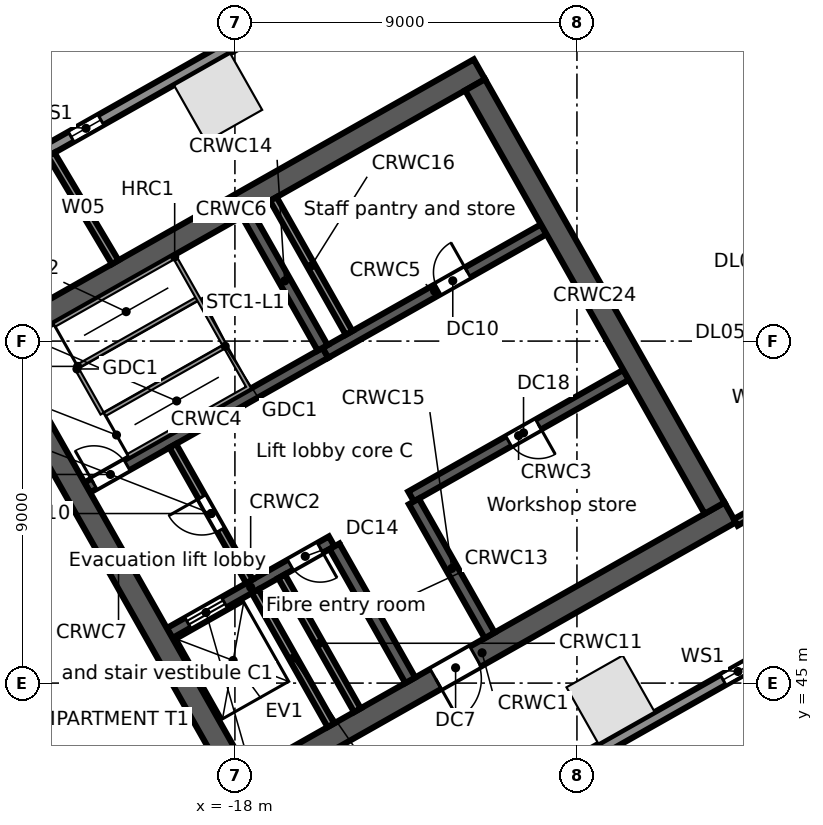
"""IFC4 building model, lengths in metres.
Left out: names, types, materials, properties, quantities, classifications, styles, units other than length and angle.
Written with IfcOpenShell. Run it as: python <this file> out.ifc"""

import sys

from ifc_helpers import new_model, si_unit, direction, frame, frame_2d, origin, origin_2d, place, context, subcontext, project, spatial, rectangle, extrude, element, fill, save


model = new_model("IFC4")
c1 = context("Model", 3, precision=1e-05, world=origin(), true_north=direction((0.0, 1.0)))
c2 = subcontext(c1, "Body", "Model", "MODEL_VIEW")
j1 = project(units=[si_unit("LENGTHUNIT", "METRE"), si_unit("PLANEANGLEUNIT", "RADIAN")], contexts=[c1])
p1 = place(None, origin())
s1 = spatial("IfcSite", under=j1, at=p1, CompositionType="ELEMENT")
p2 = place(p1, origin())
s2 = spatial("IfcBuilding", under=s1, at=p2, CompositionType="ELEMENT")
p3 = place(p2, frame((0.0, 0.0, 36.5)))
s3 = spatial("IfcBuildingStorey", under=s2, at=p3, CompositionType="ELEMENT", Elevation=36.5)
for number, where, z_axis, x_axis in (
    (1, (-18.441, 60.406, 0.0), (0.0, 0.0, 1.0), (-0.87, -0.492, 0.0)),
    (2, (-8.117, 44.568, 0.0), (0.0, 0.0, 1.0), (0.87, 0.492, 0.0)),
):
    element("IfcColumn", number, at=place(p3, frame(where, z_axis=z_axis, x_axis=x_axis)), inside=s3, PredefinedType="COLUMN", context=c2, shape_type="SweptSolid", body=[
        extrude(rectangle(XDim=1.7, YDim=1.7, at=origin_2d()), origin(), (0.0, 0.0, 1.0), 5.0),
    ])
p4 = place(p3, frame((-58.745, 38.764, 0.0), z_axis=(0.0, 0.0, 1.0), x_axis=(0.870355811726, 0.492423355453, 0.0)))
e3 = element("IfcWall", 3, at=p4, inside=s3, PredefinedType="STANDARD", context=c2, shape_type="SweptSolid", body=[
    extrude(rectangle(XDim=64.025, YDim=0.3, at=frame_2d((32.013, 0.0))), origin(), (0.0, 0.0, 1.0), 4.68),
])
p5 = place(p4, frame((60.122, 0.0, 0.6)))
e4 = element("IfcOpeningElement", 4, at=p5, cuts=e3, PredefinedType="OPENING", context=c2, shape_type="SweptSolid", body=[
    extrude(rectangle(XDim=0.9, YDim=3.2, at=frame_2d((0.45, 1.6))), frame((0.0, 0.16, 0.0), z_axis=(0.0, -1.0, 0.0), x_axis=(1.0, 0.0, 0.0)), (0.0, 0.0, 1.0), 0.32),
])
p6 = place(p4, frame((50.992, 0.0, 0.6)))
e5 = element("IfcOpeningElement", 5, at=p6, cuts=e3, PredefinedType="OPENING", context=c2, shape_type="SweptSolid", body=[
    extrude(rectangle(XDim=0.9, YDim=3.2, at=frame_2d((0.45, 1.6))), frame((0.0, 0.16, 0.0), z_axis=(0.0, -1.0, 0.0), x_axis=(1.0, 0.0, 0.0)), (0.0, 0.0, 1.0), 0.32),
])
p7 = place(p4, frame((41.862, 0.0, 0.6)))
e6 = element("IfcOpeningElement", 6, at=p7, cuts=e3, PredefinedType="OPENING", context=c2, shape_type="SweptSolid", body=[
    extrude(rectangle(XDim=0.9, YDim=3.2, at=frame_2d((0.45, 1.6))), frame((0.0, 0.16, 0.0), z_axis=(0.0, -1.0, 0.0), x_axis=(1.0, 0.0, 0.0)), (0.0, 0.0, 1.0), 0.32),
])
p8 = place(p4, frame((32.732, 0.0, 0.6)))
e7 = element("IfcOpeningElement", 7, at=p8, cuts=e3, PredefinedType="OPENING", context=c2, shape_type="SweptSolid", body=[
    extrude(rectangle(XDim=0.9, YDim=3.2, at=frame_2d((0.45, 1.6))), frame((0.0, 0.16, 0.0), z_axis=(0.0, -1.0, 0.0), x_axis=(1.0, 0.0, 0.0)), (0.0, 0.0, 1.0), 0.32),
])
p9 = place(p4, frame((23.602, 0.0, 0.6)))
e8 = element("IfcOpeningElement", 8, at=p9, cuts=e3, PredefinedType="OPENING", context=c2, shape_type="SweptSolid", body=[
    extrude(rectangle(XDim=0.9, YDim=3.2, at=frame_2d((0.45, 1.6))), frame((0.0, 0.16, 0.0), z_axis=(0.0, -1.0, 0.0), x_axis=(1.0, 0.0, 0.0)), (0.0, 0.0, 1.0), 0.32),
])
p10 = place(p4, frame((14.472, 0.0, 0.6)))
e9 = element("IfcOpeningElement", 9, at=p10, cuts=e3, PredefinedType="OPENING", context=c2, shape_type="SweptSolid", body=[
    extrude(rectangle(XDim=0.9, YDim=3.2, at=frame_2d((0.45, 1.6))), frame((0.0, 0.16, 0.0), z_axis=(0.0, -1.0, 0.0), x_axis=(1.0, 0.0, 0.0)), (0.0, 0.0, 1.0), 0.32),
])
p11 = place(p4, frame((5.342, 0.0, 0.6)))
e10 = element("IfcOpeningElement", 10, at=p11, cuts=e3, PredefinedType="OPENING", context=c2, shape_type="SweptSolid", body=[
    extrude(rectangle(XDim=0.9, YDim=3.2, at=frame_2d((0.45, 1.6))), frame((0.0, 0.16, 0.0), z_axis=(0.0, -1.0, 0.0), x_axis=(1.0, 0.0, 0.0)), (0.0, 0.0, 1.0), 0.32),
])
p12 = place(p3, frame((-0.055, 47.969, 0.0), z_axis=(0.0, 0.0, 1.0), x_axis=(-0.870355730478, -0.492423499058, 0.0)))
e11 = element("IfcWall", 11, at=p12, inside=s3, PredefinedType="STANDARD", context=c2, shape_type="SweptSolid", body=[
    extrude(rectangle(XDim=43.75, YDim=0.3, at=frame_2d((21.875, 0.0))), origin(), (0.0, 0.0, 1.0), 4.68),
])
p13 = place(p12, frame((39.977, 0.0, 0.6)))
e12 = element("IfcOpeningElement", 12, at=p13, cuts=e11, PredefinedType="OPENING", context=c2, shape_type="SweptSolid", body=[
    extrude(rectangle(XDim=0.9, YDim=3.2, at=frame_2d((0.45, 1.6))), frame((0.0, 0.16, 0.0), z_axis=(0.0, -1.0, 0.0), x_axis=(1.0, 0.0, 0.0)), (0.0, 0.0, 1.0), 0.32),
])
p14 = place(p12, frame((31.222, 0.0, 0.6)))
e13 = element("IfcOpeningElement", 13, at=p14, cuts=e11, PredefinedType="OPENING", context=c2, shape_type="SweptSolid", body=[
    extrude(rectangle(XDim=0.9, YDim=3.2, at=frame_2d((0.45, 1.6))), frame((0.0, 0.16, 0.0), z_axis=(0.0, -1.0, 0.0), x_axis=(1.0, 0.0, 0.0)), (0.0, 0.0, 1.0), 0.32),
])
p15 = place(p12, frame((22.468, 0.0, 0.6)))
e14 = element("IfcOpeningElement", 14, at=p15, cuts=e11, PredefinedType="OPENING", context=c2, shape_type="SweptSolid", body=[
    extrude(rectangle(XDim=0.9, YDim=3.2, at=frame_2d((0.45, 1.6))), frame((0.0, 0.16, 0.0), z_axis=(0.0, -1.0, 0.0), x_axis=(1.0, 0.0, 0.0)), (0.0, 0.0, 1.0), 0.32),
])
p16 = place(p12, frame((13.713, 0.0, 0.6)))
e15 = element("IfcOpeningElement", 15, at=p16, cuts=e11, PredefinedType="OPENING", context=c2, shape_type="SweptSolid", body=[
    extrude(rectangle(XDim=0.9, YDim=3.2, at=frame_2d((0.45, 1.6))), frame((0.0, 0.16, 0.0), z_axis=(0.0, -1.0, 0.0), x_axis=(1.0, 0.0, 0.0)), (0.0, 0.0, 1.0), 0.32),
])
p17 = place(p12, frame((4.959, 0.0, 0.6)))
e16 = element("IfcOpeningElement", 16, at=p17, cuts=e11, PredefinedType="OPENING", context=c2, shape_type="SweptSolid", body=[
    extrude(rectangle(XDim=0.9, YDim=3.2, at=frame_2d((0.45, 1.6))), frame((0.0, 0.16, 0.0), z_axis=(0.0, -1.0, 0.0), x_axis=(1.0, 0.0, 0.0)), (0.0, 0.0, 1.0), 0.32),
])
p18 = place(p3, frame((-18.024, 42.104, 0.0), z_axis=(0.0, 0.0, 1.0), x_axis=(0.870360574057, 0.492414937962, 0.0)))
e17 = element("IfcWall", 17, at=p18, inside=s3, PredefinedType="SOLIDWALL", context=c2, shape_type="SweptSolid", body=[
    extrude(rectangle(XDim=15.0, YDim=0.6, at=frame_2d((7.5, 0.0))), origin(), (0.0, 0.0, 1.0), 4.68),
])
p19 = place(p18, frame((6.1, 0.0, 0.0)))
e18 = element("IfcOpeningElement", 18, at=p19, cuts=e17, PredefinedType="OPENING", context=c2, shape_type="SweptSolid", body=[
    extrude(rectangle(XDim=1.2, YDim=2.1, at=frame_2d((0.6, 1.05))), frame((0.0, 0.31, 0.0), z_axis=(0.0, -1.0, 0.0), x_axis=(1.0, 0.0, 0.0)), (0.0, 0.0, 1.0), 0.62),
])
p20 = place(p3, frame((-19.718, 46.316, 0.0), z_axis=(0.0, 0.0, 1.0), x_axis=(0.870353963862, 0.492426621528, 0.0)))
e19 = element("IfcWall", 19, at=p20, inside=s3, PredefinedType="SOLIDWALL", context=c2, shape_type="SweptSolid", body=[
    extrude(rectangle(XDim=4.9, YDim=0.3, at=frame_2d((2.45, 0.0))), origin(), (0.0, 0.0, 1.0), 4.68),
])
p21 = place(p20, frame((0.55, 0.0, 0.0)))
e20 = element("IfcOpeningElement", 20, at=p21, cuts=e19, PredefinedType="OPENING", context=c2, shape_type="SweptSolid", body=[
    extrude(rectangle(XDim=1.1, YDim=2.1, at=frame_2d((0.55, 1.05))), frame((0.0, 0.16, 0.0), z_axis=(0.0, -1.0, 0.0), x_axis=(1.0, 0.0, 0.0)), (0.0, 0.0, 1.0), 0.32),
])
p22 = place(p20, frame((3.65, 0.0, 0.0)))
e21 = element("IfcOpeningElement", 21, at=p22, cuts=e19, PredefinedType="OPENING", context=c2, shape_type="SweptSolid", body=[
    extrude(rectangle(XDim=0.9, YDim=2.1, at=frame_2d((0.45, 1.05))), frame((0.0, 0.16, 0.0), z_axis=(0.0, -1.0, 0.0), x_axis=(1.0, 0.0, 0.0)), (0.0, 0.0, 1.0), 0.32),
])
p23 = place(p3, frame((-13.365, 49.911, 0.0), z_axis=(0.0, 0.0, 1.0), x_axis=(0.870340995471, 0.49244954219, 0.0)))
e22 = element("IfcWall", 22, at=p23, inside=s3, PredefinedType="SOLIDWALL", context=c2, shape_type="SweptSolid", body=[
    extrude(rectangle(XDim=6.5, YDim=0.3, at=frame_2d((3.25, 0.0))), origin(), (0.0, 0.0, 1.0), 4.68),
])
p24 = place(p23, frame((2.95, 0.0, 0.0)))
e23 = element("IfcOpeningElement", 23, at=p24, cuts=e22, PredefinedType="OPENING", context=c2, shape_type="SweptSolid", body=[
    extrude(rectangle(XDim=0.9, YDim=2.1, at=frame_2d((0.45, 1.05))), frame((0.0, 0.16, 0.0), z_axis=(0.0, -1.0, 0.0), x_axis=(1.0, 0.0, 0.0)), (0.0, 0.0, 1.0), 0.32),
])
p25 = place(p3, frame((-21.885, 50.146, 0.0), z_axis=(0.0, 0.0, 1.0), x_axis=(0.870359411463, 0.492416992881, 0.0)))
e24 = element("IfcWall", 24, at=p25, inside=s3, PredefinedType="SOLIDWALL", context=c2, shape_type="SweptSolid", body=[
    extrude(rectangle(XDim=7.2, YDim=0.3, at=frame_2d((3.6, 0.0))), origin(), (0.0, 0.0, 1.0), 4.68),
])
p26 = place(p25, frame((0.2, 0.0, 0.0)))
e25 = element("IfcOpeningElement", 25, at=p26, cuts=e24, PredefinedType="OPENING", context=c2, shape_type="SweptSolid", body=[
    extrude(rectangle(XDim=1.0, YDim=2.1, at=frame_2d((0.5, 1.05))), frame((0.0, 0.16, 0.0), z_axis=(0.0, -1.0, 0.0), x_axis=(1.0, 0.0, 0.0)), (0.0, 0.0, 1.0), 0.32),
])
p27 = place(p3, frame((-15.618, 53.691, 0.0), z_axis=(0.0, 0.0, 1.0), x_axis=(0.870356769198, 0.492421663121, 0.0)))
e26 = element("IfcWall", 26, at=p27, inside=s3, PredefinedType="SOLIDWALL", context=c2, shape_type="SweptSolid", body=[
    extrude(rectangle(XDim=6.6, YDim=0.3, at=frame_2d((3.3, 0.0))), origin(), (0.0, 0.0, 1.0), 4.68),
])
p28 = place(p27, frame((3.4, 0.0, 0.0)))
e27 = element("IfcOpeningElement", 27, at=p28, cuts=e26, PredefinedType="OPENING", context=c2, shape_type="SweptSolid", body=[
    extrude(rectangle(XDim=0.9, YDim=2.1, at=frame_2d((0.45, 1.05))), frame((0.0, 0.16, 0.0), z_axis=(0.0, -1.0, 0.0), x_axis=(1.0, 0.0, 0.0)), (0.0, 0.0, 1.0), 0.32),
])
p29 = place(p3, frame((-24.623, 53.767, 0.0), z_axis=(0.0, 0.0, 1.0), x_axis=(0.870356627484, 0.492421913601, 0.0)))
e28 = element("IfcWall", 28, at=p29, inside=s3, PredefinedType="SOLIDWALL", context=c2, shape_type="SweptSolid", body=[
    extrude(rectangle(XDim=15.0, YDim=0.6, at=frame_2d((7.5, 0.0))), origin(), (0.0, 0.0, 1.0), 4.68),
])
p30 = place(p3, frame((-24.214, 53.654, 0.0), z_axis=(0.0, 0.0, 1.0), x_axis=(0.492441221355, -0.870345703448, 0.0)))
e29 = element("IfcWall", 29, at=p30, inside=s3, PredefinedType="SOLIDWALL", context=c2, shape_type="SweptSolid", body=[
    extrude(rectangle(XDim=12.8, YDim=0.6, at=frame_2d((6.4, 0.0))), origin(), (0.0, 0.0, 1.0), 4.68),
])
p31 = place(p3, frame((-17.469, 47.417, 0.0), z_axis=(0.0, 0.0, 1.0), x_axis=(0.492440575896, -0.870346068648, 0.0)))
e30 = element("IfcWall", 30, at=p31, inside=s3, PredefinedType="SOLIDWALL", context=c2, shape_type="SweptSolid", body=[
    extrude(rectangle(XDim=4.05, YDim=0.2, at=frame_2d((2.025, 0.0))), origin(), (0.0, 0.0, 1.0), 4.68),
])
p32 = place(p3, frame((-19.635, 51.246, 0.0), z_axis=(0.0, 0.0, 1.0), x_axis=(0.492408451753, -0.87036424366, 0.0)))
e31 = element("IfcWall", 31, at=p32, inside=s3, PredefinedType="PARTITIONING", context=c2, shape_type="SweptSolid", body=[
    extrude(rectangle(XDim=4.1, YDim=0.2, at=frame_2d((2.05, 0.0))), origin(), (0.0, 0.0, 1.0), 4.68),
])
p33 = place(p32, frame((1.55, 0.0, 0.0)))
e32 = element("IfcOpeningElement", 32, at=p33, cuts=e31, PredefinedType="OPENING", context=c2, shape_type="SweptSolid", body=[
    extrude(rectangle(XDim=1.0, YDim=2.1, at=frame_2d((0.5, 1.05))), frame((0.0, 0.11, 0.0), z_axis=(0.0, -1.0, 0.0), x_axis=(1.0, 0.0, 0.0)), (0.0, 0.0, 1.0), 0.22),
])
p34 = place(p3, frame((-16.772, 47.811, 0.0), z_axis=(0.0, 0.0, 1.0), x_axis=(0.492440575896, -0.870346068648, 0.0)))
e33 = element("IfcWall", 33, at=p34, inside=s3, PredefinedType="SOLIDWALL", context=c2, shape_type="SweptSolid", body=[
    extrude(rectangle(XDim=4.05, YDim=0.2, at=frame_2d((2.025, 0.0))), origin(), (0.0, 0.0, 1.0), 4.68),
])
p35 = place(p3, frame((-15.379, 48.599, 0.0), z_axis=(0.0, 0.0, 1.0), x_axis=(0.492394910396, -0.870371904542, 0.0)))
e34 = element("IfcWall", 34, at=p35, inside=s3, PredefinedType="SOLIDWALL", context=c2, shape_type="SweptSolid", body=[
    extrude(rectangle(XDim=4.05, YDim=0.3, at=frame_2d((2.025, 0.0))), origin(), (0.0, 0.0, 1.0), 4.68),
])
p36 = place(p3, frame((-17.686, 57.347, 0.0), z_axis=(0.0, 0.0, 1.0), x_axis=(0.492420746998, -0.870357287513, 0.0)))
e35 = element("IfcWall", 35, at=p36, inside=s3, PredefinedType="SOLIDWALL", context=c2, shape_type="SweptSolid", body=[
    extrude(rectangle(XDim=4.05, YDim=0.3, at=frame_2d((2.025, 0.0))), origin(), (0.0, 0.0, 1.0), 4.68),
])
p37 = place(p3, frame((-13.291, 49.781, 0.0), z_axis=(0.0, 0.0, 1.0), x_axis=(0.492394910396, -0.870371904542, 0.0)))
e36 = element("IfcWall", 36, at=p37, inside=s3, PredefinedType="SOLIDWALL", context=c2, shape_type="SweptSolid", body=[
    extrude(rectangle(XDim=4.05, YDim=0.3, at=frame_2d((2.025, 0.0))), origin(), (0.0, 0.0, 1.0), 4.68),
])
p38 = place(p3, frame((-16.99, 57.741, 0.0), z_axis=(0.0, 0.0, 1.0), x_axis=(0.492394910396, -0.870371904542, 0.0)))
e37 = element("IfcWall", 37, at=p38, inside=s3, PredefinedType="SOLIDWALL", context=c2, shape_type="SweptSolid", body=[
    extrude(rectangle(XDim=4.05, YDim=0.2, at=frame_2d((2.025, 0.0))), origin(), (0.0, 0.0, 1.0), 4.68),
])
p39 = place(p3, frame((-11.681, 60.744, 0.0), z_axis=(0.0, 0.0, 1.0), x_axis=(0.492426772896, -0.870353878221, 0.0)))
e38 = element("IfcWall", 38, at=p39, inside=s3, PredefinedType="SOLIDWALL", context=c2, shape_type="SweptSolid", body=[
    extrude(rectangle(XDim=12.8, YDim=0.6, at=frame_2d((6.4, 0.0))), origin(), (0.0, 0.0, 1.0), 4.68),
])
p40 = place(p3, frame((-22.835, 58.908, 0.0), z_axis=(0.0, 0.0, 1.0), x_axis=(0.511113859879, -0.859513014584, 0.0)))
e39 = element("IfcWall", 39, at=p40, inside=s3, PredefinedType="PARTITIONING", context=c2, shape_type="SweptSolid", body=[
    extrude(rectangle(XDim=3.295, YDim=0.2, at=frame_2d((1.647, 0.0))), origin(), (0.0, 0.0, 1.0), 3.96),
])
p41 = place(p3, frame((-4.821, 49.23, 0.0), z_axis=(0.0, 0.0, 1.0), x_axis=(0.870371217631, 0.492396124598, 0.0)))
e40 = element("IfcWall", 40, at=p41, inside=s3, PredefinedType="PARTITIONING", context=c2, shape_type="SweptSolid", body=[
    extrude(rectangle(XDim=2.659, YDim=0.2, at=frame_2d((1.329, 0.0))), origin(), (0.0, 0.0, 1.0), 4.68),
])
p42 = place(p7, origin())
e41 = element("IfcWindow", 41, at=p42, inside=s3, PartitioningType="SINGLE_PANEL", PredefinedType="WINDOW", context=c2, shape_type="SweptSolid", body=[
    extrude(rectangle(XDim=0.9, YDim=3.2, at=frame_2d((0.45, 1.6))), frame((0.0, 0.03, 0.0), z_axis=(0.0, -1.0, 0.0), x_axis=(1.0, 0.0, 0.0)), (0.0, 0.0, 1.0), 0.06),
])
fill(e6, e41)
p43 = place(p17, origin())
e42 = element("IfcWindow", 42, at=p43, inside=s3, PartitioningType="SINGLE_PANEL", PredefinedType="WINDOW", context=c2, shape_type="SweptSolid", body=[
    extrude(rectangle(XDim=0.9, YDim=3.2, at=frame_2d((0.45, 1.6))), frame((0.0, 0.03, 0.0), z_axis=(0.0, -1.0, 0.0), x_axis=(1.0, 0.0, 0.0)), (0.0, 0.0, 1.0), 0.06),
])
fill(e16, e42)
p44 = place(p21, origin())
e43 = element("IfcDoor", 43, at=p44, inside=s3, OperationType="DOUBLE_DOOR_SLIDING", PredefinedType="DOOR", context=c2, shape_type="SweptSolid", body=[
    extrude(rectangle(XDim=1.1, YDim=2.1, at=frame_2d((0.55, 1.05))), frame((0.0, 0.025, 0.0), z_axis=(0.0, -1.0, 0.0), x_axis=(1.0, 0.0, 0.0)), (0.0, 0.0, 1.0), 0.05),
])
fill(e20, e43)
p45 = place(p26, origin())
e44 = element("IfcDoor", 44, at=p45, inside=s3, OperationType="SINGLE_SWING_LEFT", PredefinedType="DOOR", context=c2, shape_type="SweptSolid", body=[
    extrude(rectangle(XDim=1.0, YDim=2.1, at=frame_2d((0.5, 1.05))), frame((0.0, 0.025, 0.0), z_axis=(0.0, -1.0, 0.0), x_axis=(1.0, 0.0, 0.0)), (0.0, 0.0, 1.0), 0.05),
])
fill(e25, e44)
p46 = place(p33, frame((1.0, 0.0, 0.0), z_axis=(0.0, 0.0, 1.0), x_axis=(-1.0, 0.0, 0.0)))
e45 = element("IfcDoor", 45, at=p46, inside=s3, OperationType="SINGLE_SWING_RIGHT", PredefinedType="DOOR", context=c2, shape_type="SweptSolid", body=[
    extrude(rectangle(XDim=1.0, YDim=2.1, at=frame_2d((0.5, 1.05))), frame((0.0, 0.025, 0.0), z_axis=(0.0, -1.0, 0.0), x_axis=(1.0, 0.0, 0.0)), (0.0, 0.0, 1.0), 0.05),
])
fill(e32, e45)
p47 = place(p19, frame((1.2, 0.0, 0.0), z_axis=(0.0, 0.0, 1.0), x_axis=(-1.0, 0.0, 0.0)))
e46 = element("IfcDoor", 46, at=p47, inside=s3, OperationType="SINGLE_SWING_RIGHT", PredefinedType="DOOR", context=c2, shape_type="SweptSolid", body=[
    extrude(rectangle(XDim=1.2, YDim=2.1, at=frame_2d((0.6, 1.05))), frame((0.0, 0.025, 0.0), z_axis=(0.0, -1.0, 0.0), x_axis=(1.0, 0.0, 0.0)), (0.0, 0.0, 1.0), 0.05),
])
fill(e18, e46)
p48 = place(p28, origin())
e47 = element("IfcDoor", 47, at=p48, inside=s3, OperationType="SINGLE_SWING_RIGHT", PredefinedType="DOOR", context=c2, shape_type="SweptSolid", body=[
    extrude(rectangle(XDim=0.9, YDim=2.1, at=frame_2d((0.45, 1.05))), frame((0.0, 0.025, 0.0), z_axis=(0.0, -1.0, 0.0), x_axis=(1.0, 0.0, 0.0)), (0.0, 0.0, 1.0), 0.05),
])
fill(e27, e47)
p49 = place(p22, frame((0.9, 0.0, 0.0), z_axis=(0.0, 0.0, 1.0), x_axis=(-1.0, 0.0, 0.0)))
e48 = element("IfcDoor", 48, at=p49, inside=s3, OperationType="SINGLE_SWING_LEFT", PredefinedType="DOOR", context=c2, shape_type="SweptSolid", body=[
    extrude(rectangle(XDim=0.9, YDim=2.1, at=frame_2d((0.45, 1.05))), frame((0.0, 0.025, 0.0), z_axis=(0.0, -1.0, 0.0), x_axis=(1.0, 0.0, 0.0)), (0.0, 0.0, 1.0), 0.05),
])
fill(e21, e48)
p50 = place(p24, frame((0.9, 0.0, 0.0), z_axis=(0.0, 0.0, 1.0), x_axis=(-1.0, 0.0, 0.0)))
e49 = element("IfcDoor", 49, at=p50, inside=s3, OperationType="SINGLE_SWING_LEFT", PredefinedType="DOOR", context=c2, shape_type="SweptSolid", body=[
    extrude(rectangle(XDim=0.9, YDim=2.1, at=frame_2d((0.45, 1.05))), frame((0.0, 0.025, 0.0), z_axis=(0.0, -1.0, 0.0), x_axis=(1.0, 0.0, 0.0)), (0.0, 0.0, 1.0), 0.05),
])
fill(e23, e49)
save(model, sys.argv[1])
